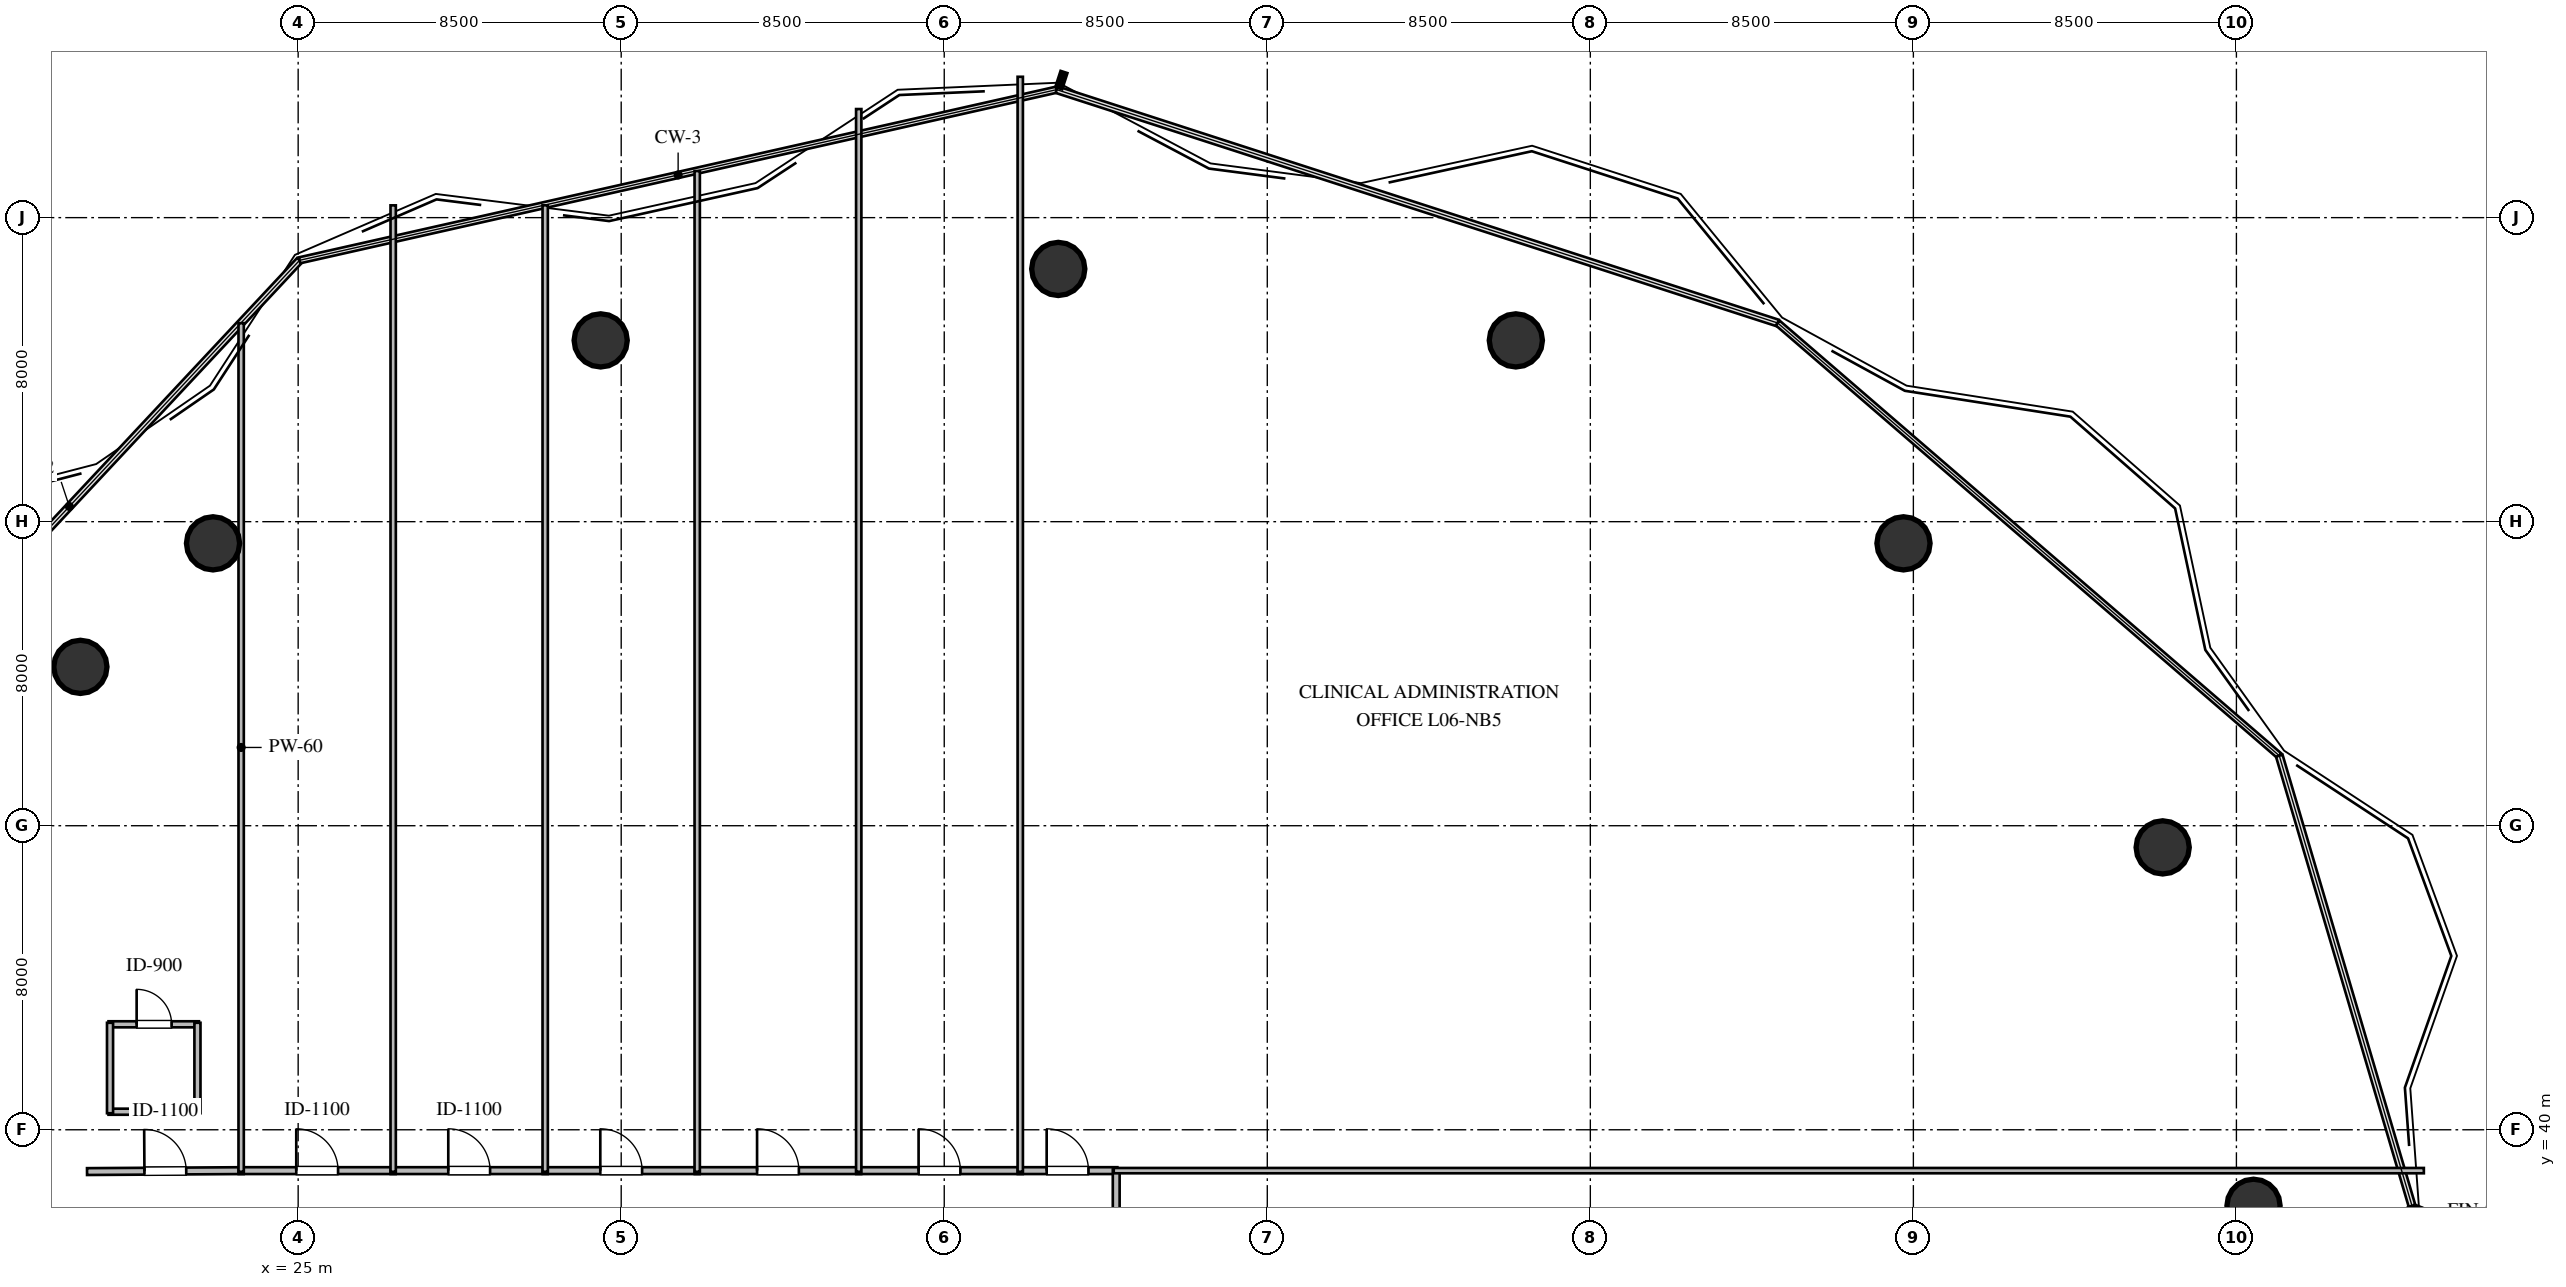
"""IFC4 building model, lengths in metres.
Left out: names, types, materials, properties, quantities, classifications, styles, units other than length and angle.
Written with IfcOpenShell. Run it as: python <this file> out.ifc"""

import sys

from ifc_helpers import new_model, si_unit, direction, frame, frame_2d, origin, origin_2d, place, context, subcontext, project, spatial, rectangle, circle, extrude, element, fill, save


model = new_model("IFC4")
c1 = context("Model", 3, precision=1e-05, world=origin(), true_north=direction((0.0, 1.0)))
c2 = subcontext(c1, "Body", "Model", "MODEL_VIEW")
j1 = project(units=[si_unit("LENGTHUNIT", "METRE"), si_unit("PLANEANGLEUNIT", "RADIAN")], contexts=[c1])
p1 = place(None, origin())
s1 = spatial("IfcSite", under=j1, at=p1, CompositionType="ELEMENT")
p2 = place(p1, origin())
s2 = spatial("IfcBuilding", under=s1, at=p2, CompositionType="ELEMENT")
p3 = place(p2, frame((0.0, 0.0, 27.6)))
s3 = spatial("IfcBuildingStorey", under=s2, at=p3, CompositionType="ELEMENT", Elevation=27.6)
for number, where, z_axis, x_axis in (
    (1, (76.45, 38.0, 0.0), (0.0, 0.0, 1.0), (1.0, 0.0, 0.0)),
    (2, (74.06, 47.43, 0.0), (0.0, 0.0, 1.0), (1.0, 0.0, 0.0)),
    (3, (67.24, 55.43, 0.0), (0.0, 0.0, 1.0), (1.0, 0.0, 0.0)),
    (4, (57.04, 60.77, 0.0), (0.0, 0.0, 1.0), (1.0, 0.0, 0.0)),
    (5, (45.0, 62.65, 0.0), (0.0, 0.0, 1.0), (1.0, 0.0, 0.0)),
    (6, (32.96, 60.77, 0.0), (0.0, 0.0, 1.0), (1.0, 0.0, 0.0)),
    (7, (22.76, 55.43, 0.0), (0.0, 0.0, 1.0), (1.0, 0.0, 0.0)),
    (8, (19.27, 52.18, 0.0), (0.0, 0.0, 1.0), (1.0, 0.0, 0.0)),
):
    element("IfcColumn", number, at=place(p3, frame(where, z_axis=z_axis, x_axis=x_axis)), inside=s3, PredefinedType="COLUMN", context=c2, shape_type="SweptSolid", body=[
        extrude(circle(Radius=0.7, at=origin_2d()), origin(), (0.0, 0.0, 1.0), 3.6),
    ])
p4 = place(p3, frame((20.01, 40.475, 0.0), z_axis=(0.0, 0.0, 1.0), x_axis=(1.0, 0.0, 0.0)))
e9 = element("IfcWall", 9, at=p4, inside=s3, PredefinedType="PLUMBINGWALL", context=c2, shape_type="SweptSolid", body=[
    extrude(rectangle(XDim=2.38, YDim=0.16, at=frame_2d((1.19, 0.0))), origin(), (0.0, 0.0, 1.0), 3.36),
])
p5 = place(p3, frame((20.01, 42.775, 0.0), z_axis=(0.0, 0.0, 1.0), x_axis=(1.0, 0.0, 0.0)))
e10 = element("IfcWall", 10, at=p5, inside=s3, PredefinedType="PLUMBINGWALL", context=c2, shape_type="SweptSolid", body=[
    extrude(rectangle(XDim=2.38, YDim=0.16, at=frame_2d((1.19, 0.0))), origin(), (0.0, 0.0, 1.0), 3.36),
])
p6 = place(p5, frame((0.74, 0.0, 0.0)))
e11 = element("IfcOpeningElement", 11, at=p6, cuts=e10, PredefinedType="OPENING", context=c2, shape_type="SweptSolid", body=[
    extrude(rectangle(XDim=0.92, YDim=2.1, at=frame_2d((0.46, 1.05))), frame((0.0, 0.09, 0.0), z_axis=(0.0, -1.0, 0.0), x_axis=(1.0, 0.0, 0.0)), (0.0, 0.0, 1.0), 0.18),
])
p7 = place(p3, frame((20.05, 40.435, 0.0), z_axis=(0.0, 0.0, 1.0), x_axis=(0.0, 1.0, 0.0)))
e12 = element("IfcWall", 12, at=p7, inside=s3, PredefinedType="PLUMBINGWALL", context=c2, shape_type="SweptSolid", body=[
    extrude(rectangle(XDim=2.38, YDim=0.16, at=frame_2d((1.19, 0.0))), origin(), (0.0, 0.0, 1.0), 3.36),
])
p8 = place(p3, frame((22.35, 40.435, 0.0), z_axis=(0.0, 0.0, 1.0), x_axis=(0.0, 1.0, 0.0)))
e13 = element("IfcWall", 13, at=p8, inside=s3, PredefinedType="PLUMBINGWALL", context=c2, shape_type="SweptSolid", body=[
    extrude(rectangle(XDim=2.38, YDim=0.16, at=frame_2d((1.19, 0.0))), origin(), (0.0, 0.0, 1.0), 2.806),
])
p9 = place(p3, frame((19.445, 38.9, 0.0), z_axis=(0.0, 0.0, 1.0), x_axis=(0.999981372921, 0.00610359001, 0.0)))
e14 = element("IfcWall", 14, at=p9, inside=s3, PredefinedType="PARTITIONING", context=c2, shape_type="SweptSolid", body=[
    extrude(rectangle(XDim=4.12, YDim=0.18, at=frame_2d((2.06, 0.0))), origin(), (0.0, 0.0, 1.0), 3.36),
])
p10 = place(p9, frame((1.51, 0.0, 0.0)))
e15 = element("IfcOpeningElement", 15, at=p10, cuts=e14, PredefinedType="OPENING", context=c2, shape_type="SweptSolid", body=[
    extrude(rectangle(XDim=1.1, YDim=2.1, at=frame_2d((0.55, 1.05))), frame((0.0, 0.1, 0.0), z_axis=(0.0, -1.0, 0.0), x_axis=(1.0, 0.0, 0.0)), (0.0, 0.0, 1.0), 0.2),
])
p11 = place(p3, frame((23.435, 38.925, 0.0), z_axis=(0.0, 0.0, 1.0), x_axis=(1.0, 0.0, 0.0)))
e16 = element("IfcWall", 16, at=p11, inside=s3, PredefinedType="PARTITIONING", context=c2, shape_type="SweptSolid", body=[
    extrude(rectangle(XDim=4.13, YDim=0.18, at=frame_2d((2.065, 0.0))), origin(), (0.0, 0.0, 1.0), 3.36),
])
p12 = place(p11, frame((1.515, 0.0, 0.0)))
e17 = element("IfcOpeningElement", 17, at=p12, cuts=e16, PredefinedType="OPENING", context=c2, shape_type="SweptSolid", body=[
    extrude(rectangle(XDim=1.1, YDim=2.1, at=frame_2d((0.55, 1.05))), frame((0.0, 0.1, 0.0), z_axis=(0.0, -1.0, 0.0), x_axis=(1.0, 0.0, 0.0)), (0.0, 0.0, 1.0), 0.2),
])
p13 = place(p3, frame((27.435, 38.925, 0.0), z_axis=(0.0, 0.0, 1.0), x_axis=(1.0, 0.0, 0.0)))
e18 = element("IfcWall", 18, at=p13, inside=s3, PredefinedType="PARTITIONING", context=c2, shape_type="SweptSolid", body=[
    extrude(rectangle(XDim=4.13, YDim=0.18, at=frame_2d((2.065, 0.0))), origin(), (0.0, 0.0, 1.0), 3.36),
])
p14 = place(p13, frame((1.515, 0.0, 0.0)))
e19 = element("IfcOpeningElement", 19, at=p14, cuts=e18, PredefinedType="OPENING", context=c2, shape_type="SweptSolid", body=[
    extrude(rectangle(XDim=1.1, YDim=2.1, at=frame_2d((0.55, 1.05))), frame((0.0, 0.1, 0.0), z_axis=(0.0, -1.0, 0.0), x_axis=(1.0, 0.0, 0.0)), (0.0, 0.0, 1.0), 0.2),
])
p15 = place(p3, frame((31.435, 38.925, 0.0), z_axis=(0.0, 0.0, 1.0), x_axis=(1.0, 0.0, 0.0)))
e20 = element("IfcWall", 20, at=p15, inside=s3, PredefinedType="PARTITIONING", context=c2, shape_type="SweptSolid", body=[
    extrude(rectangle(XDim=4.13, YDim=0.18, at=frame_2d((2.065, 0.0))), origin(), (0.0, 0.0, 1.0), 3.36),
])
p16 = place(p15, frame((1.515, 0.0, 0.0)))
e21 = element("IfcOpeningElement", 21, at=p16, cuts=e20, PredefinedType="OPENING", context=c2, shape_type="SweptSolid", body=[
    extrude(rectangle(XDim=1.1, YDim=2.1, at=frame_2d((0.55, 1.05))), frame((0.0, 0.1, 0.0), z_axis=(0.0, -1.0, 0.0), x_axis=(1.0, 0.0, 0.0)), (0.0, 0.0, 1.0), 0.2),
])
p17 = place(p3, frame((35.435, 38.925, 0.0), z_axis=(0.0, 0.0, 1.0), x_axis=(1.0, 0.0, 0.0)))
e22 = element("IfcWall", 22, at=p17, inside=s3, PredefinedType="PARTITIONING", context=c2, shape_type="SweptSolid", body=[
    extrude(rectangle(XDim=4.38, YDim=0.18, at=frame_2d((2.19, 0.0))), origin(), (0.0, 0.0, 1.0), 3.36),
])
p18 = place(p17, frame((1.64, 0.0, 0.0)))
e23 = element("IfcOpeningElement", 23, at=p18, cuts=e22, PredefinedType="OPENING", context=c2, shape_type="SweptSolid", body=[
    extrude(rectangle(XDim=1.1, YDim=2.1, at=frame_2d((0.55, 1.05))), frame((0.0, 0.1, 0.0), z_axis=(0.0, -1.0, 0.0), x_axis=(1.0, 0.0, 0.0)), (0.0, 0.0, 1.0), 0.2),
])
p19 = place(p3, frame((39.685, 38.925, 0.0), z_axis=(0.0, 0.0, 1.0), x_axis=(1.0, 0.0, 0.0)))
e24 = element("IfcWall", 24, at=p19, inside=s3, PredefinedType="PARTITIONING", context=c2, shape_type="SweptSolid", body=[
    extrude(rectangle(XDim=4.38, YDim=0.18, at=frame_2d((2.19, 0.0))), origin(), (0.0, 0.0, 1.0), 3.36),
])
p20 = place(p19, frame((1.64, 0.0, 0.0)))
e25 = element("IfcOpeningElement", 25, at=p20, cuts=e24, PredefinedType="OPENING", context=c2, shape_type="SweptSolid", body=[
    extrude(rectangle(XDim=1.1, YDim=2.1, at=frame_2d((0.55, 1.05))), frame((0.0, 0.1, 0.0), z_axis=(0.0, -1.0, 0.0), x_axis=(1.0, 0.0, 0.0)), (0.0, 0.0, 1.0), 0.2),
])
p21 = place(p3, frame((43.935, 38.925, 0.0), z_axis=(0.0, 0.0, 1.0), x_axis=(1.0, 0.0, 0.0)))
e26 = element("IfcWall", 26, at=p21, inside=s3, PredefinedType="PARTITIONING", context=c2, shape_type="SweptSolid", body=[
    extrude(rectangle(XDim=2.62, YDim=0.18, at=frame_2d((1.31, 0.0))), origin(), (0.0, 0.0, 1.0), 3.36),
])
p22 = place(p21, frame((0.76, 0.0, 0.0)))
e27 = element("IfcOpeningElement", 27, at=p22, cuts=e26, PredefinedType="OPENING", context=c2, shape_type="SweptSolid", body=[
    extrude(rectangle(XDim=1.1, YDim=2.1, at=frame_2d((0.55, 1.05))), frame((0.0, 0.1, 0.0), z_axis=(0.0, -1.0, 0.0), x_axis=(1.0, 0.0, 0.0)), (0.0, 0.0, 1.0), 0.2),
])
p23 = place(p3, frame((46.525, 38.955, 0.0), z_axis=(0.0, 0.0, 1.0), x_axis=(0.0, -1.0, 0.0)))
e28 = element("IfcWall", 28, at=p23, inside=s3, PredefinedType="PARTITIONING", context=c2, shape_type="SweptSolid", body=[
    extrude(rectangle(XDim=4.06, YDim=0.18, at=frame_2d((2.03, 0.0))), origin(), (0.0, 0.0, 1.0), 3.36),
])
p24 = place(p23, frame((1.48, 0.0, 0.0)))
e29 = element("IfcOpeningElement", 29, at=p24, cuts=e28, PredefinedType="OPENING", context=c2, shape_type="SweptSolid", body=[
    extrude(rectangle(XDim=1.1, YDim=2.1, at=frame_2d((0.55, 1.05))), frame((0.0, 0.1, 0.0), z_axis=(0.0, -1.0, 0.0), x_axis=(1.0, 0.0, 0.0)), (0.0, 0.0, 1.0), 0.2),
])
p25 = place(p3, frame((23.5, 61.224, 0.0), z_axis=(0.0, 0.0, 1.0), x_axis=(0.0, -1.0, 0.0)))
e30 = element("IfcWall", 30, at=p25, inside=s3, PredefinedType="PARTITIONING", context=c2, shape_type="SweptSolid", body=[
    extrude(rectangle(XDim=22.329, YDim=0.14, at=frame_2d((11.164, 0.0))), origin(), (0.0, 0.0, 1.0), 3.36),
])
p26 = place(p3, frame((27.5, 64.323, 0.0), z_axis=(0.0, 0.0, 1.0), x_axis=(0.0, -1.0, 0.0)))
e31 = element("IfcWall", 31, at=p26, inside=s3, PredefinedType="PARTITIONING", context=c2, shape_type="SweptSolid", body=[
    extrude(rectangle(XDim=25.428, YDim=0.14, at=frame_2d((12.714, 0.0))), origin(), (0.0, 0.0, 1.0), 3.36),
])
p27 = place(p3, frame((31.5, 64.324, 0.0), z_axis=(0.0, 0.0, 1.0), x_axis=(0.0, -1.0, 0.0)))
e32 = element("IfcWall", 32, at=p27, inside=s3, PredefinedType="PARTITIONING", context=c2, shape_type="SweptSolid", body=[
    extrude(rectangle(XDim=25.429, YDim=0.14, at=frame_2d((12.714, 0.0))), origin(), (0.0, 0.0, 1.0), 2.806),
])
p28 = place(p3, frame((35.5, 65.226, 0.0), z_axis=(0.0, 0.0, 1.0), x_axis=(0.0, -1.0, 0.0)))
e33 = element("IfcWall", 33, at=p28, inside=s3, PredefinedType="PARTITIONING", context=c2, shape_type="SweptSolid", body=[
    extrude(rectangle(XDim=26.331, YDim=0.14, at=frame_2d((13.165, 0.0))), origin(), (0.0, 0.0, 1.0), 3.36),
])
p29 = place(p3, frame((39.75, 66.857, 0.0), z_axis=(0.0, 0.0, 1.0), x_axis=(0.0, -1.0, 0.0)))
e34 = element("IfcWall", 34, at=p29, inside=s3, PredefinedType="PARTITIONING", context=c2, shape_type="SweptSolid", body=[
    extrude(rectangle(XDim=27.962, YDim=0.14, at=frame_2d((13.981, 0.0))), origin(), (0.0, 0.0, 1.0), 3.36),
])
p30 = place(p3, frame((44.0, 67.706, 0.0), z_axis=(0.0, 0.0, 1.0), x_axis=(0.0, -1.0, 0.0)))
e35 = element("IfcWall", 35, at=p30, inside=s3, PredefinedType="PARTITIONING", context=c2, shape_type="SweptSolid", body=[
    extrude(rectangle(XDim=28.811, YDim=0.14, at=frame_2d((14.406, 0.0))), origin(), (0.0, 0.0, 1.0), 2.806),
])
p31 = place(p3, frame((80.932, 38.925, 0.0), z_axis=(0.0, 0.0, 1.0), x_axis=(-1.0, 0.0, 0.0)))
e36 = element("IfcWall", 36, at=p31, inside=s3, PredefinedType="PARTITIONING", context=c2, shape_type="SweptSolid", body=[
    extrude(rectangle(XDim=34.472, YDim=0.14, at=frame_2d((17.236, 0.0))), origin(), (0.0, 0.0, 1.0), 3.36),
])
p32 = place(p6, origin())
e37 = element("IfcDoor", 37, at=p32, inside=s3, OperationType="SINGLE_SWING_LEFT", PredefinedType="DOOR", context=c2, shape_type="SweptSolid", body=[
    extrude(rectangle(XDim=0.92, YDim=2.1, at=frame_2d((0.46, 1.05))), frame((0.0, 0.025, 0.0), z_axis=(0.0, -1.0, 0.0), x_axis=(1.0, 0.0, 0.0)), (0.0, 0.0, 1.0), 0.05),
])
fill(e11, e37)
p33 = place(p10, origin())
e38 = element("IfcDoor", 38, at=p33, inside=s3, OperationType="SINGLE_SWING_LEFT", PredefinedType="DOOR", context=c2, shape_type="SweptSolid", body=[
    extrude(rectangle(XDim=1.1, YDim=2.1, at=frame_2d((0.55, 1.05))), frame((0.0, 0.025, 0.0), z_axis=(0.0, -1.0, 0.0), x_axis=(1.0, 0.0, 0.0)), (0.0, 0.0, 1.0), 0.05),
])
fill(e15, e38)
p34 = place(p12, origin())
e39 = element("IfcDoor", 39, at=p34, inside=s3, OperationType="SINGLE_SWING_LEFT", PredefinedType="DOOR", context=c2, shape_type="SweptSolid", body=[
    extrude(rectangle(XDim=1.1, YDim=2.1, at=frame_2d((0.55, 1.05))), frame((0.0, 0.025, 0.0), z_axis=(0.0, -1.0, 0.0), x_axis=(1.0, 0.0, 0.0)), (0.0, 0.0, 1.0), 0.05),
])
fill(e17, e39)
p35 = place(p14, origin())
e40 = element("IfcDoor", 40, at=p35, inside=s3, OperationType="SINGLE_SWING_LEFT", PredefinedType="DOOR", context=c2, shape_type="SweptSolid", body=[
    extrude(rectangle(XDim=1.1, YDim=2.1, at=frame_2d((0.55, 1.05))), frame((0.0, 0.025, 0.0), z_axis=(0.0, -1.0, 0.0), x_axis=(1.0, 0.0, 0.0)), (0.0, 0.0, 1.0), 0.05),
])
fill(e19, e40)
p36 = place(p16, origin())
e41 = element("IfcDoor", 41, at=p36, inside=s3, OperationType="SINGLE_SWING_LEFT", PredefinedType="DOOR", context=c2, shape_type="SweptSolid", body=[
    extrude(rectangle(XDim=1.1, YDim=2.1, at=frame_2d((0.55, 1.05))), frame((0.0, 0.025, 0.0), z_axis=(0.0, -1.0, 0.0), x_axis=(1.0, 0.0, 0.0)), (0.0, 0.0, 1.0), 0.05),
])
fill(e21, e41)
p37 = place(p18, origin())
e42 = element("IfcDoor", 42, at=p37, inside=s3, OperationType="SINGLE_SWING_LEFT", PredefinedType="DOOR", context=c2, shape_type="SweptSolid", body=[
    extrude(rectangle(XDim=1.1, YDim=2.1, at=frame_2d((0.55, 1.05))), frame((0.0, 0.025, 0.0), z_axis=(0.0, -1.0, 0.0), x_axis=(1.0, 0.0, 0.0)), (0.0, 0.0, 1.0), 0.05),
])
fill(e23, e42)
p38 = place(p20, origin())
e43 = element("IfcDoor", 43, at=p38, inside=s3, OperationType="SINGLE_SWING_LEFT", PredefinedType="DOOR", context=c2, shape_type="SweptSolid", body=[
    extrude(rectangle(XDim=1.1, YDim=2.1, at=frame_2d((0.55, 1.05))), frame((0.0, 0.025, 0.0), z_axis=(0.0, -1.0, 0.0), x_axis=(1.0, 0.0, 0.0)), (0.0, 0.0, 1.0), 0.05),
])
fill(e25, e43)
p39 = place(p22, origin())
e44 = element("IfcDoor", 44, at=p39, inside=s3, OperationType="SINGLE_SWING_LEFT", PredefinedType="DOOR", context=c2, shape_type="SweptSolid", body=[
    extrude(rectangle(XDim=1.1, YDim=2.1, at=frame_2d((0.55, 1.05))), frame((0.0, 0.025, 0.0), z_axis=(0.0, -1.0, 0.0), x_axis=(1.0, 0.0, 0.0)), (0.0, 0.0, 1.0), 0.05),
])
fill(e27, e44)
save(model, sys.argv[1])
